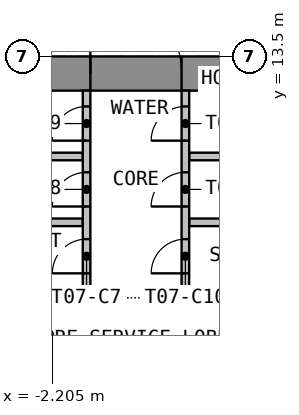
"""IFC4 building model, lengths in metres.
Left out: names, types, materials, properties, quantities, classifications, styles, units other than length and angle.
Written with IfcOpenShell. Run it as: python <this file> out.ifc"""

import sys

from ifc_helpers import new_model, si_unit, direction, frame, frame_2d, origin, place, context, subcontext, project, spatial, rectangle, extrude, element, fill, save


model = new_model("IFC4")
c1 = context("Model", 3, precision=1e-05, world=origin(), true_north=direction((0.0, 1.0)))
c2 = subcontext(c1, "Body", "Model", "MODEL_VIEW")
j1 = project(units=[si_unit("LENGTHUNIT", "METRE"), si_unit("PLANEANGLEUNIT", "RADIAN")], contexts=[c1])
p1 = place(None, origin())
s1 = spatial("IfcSite", under=j1, at=p1, CompositionType="ELEMENT")
p2 = place(p1, origin())
s2 = spatial("IfcBuilding", under=s1, at=p2, CompositionType="ELEMENT")
p3 = place(p2, frame((0.0, 0.0, 104.7)))
s3 = spatial("IfcBuildingStorey", under=s2, at=p3, CompositionType="ELEMENT", Elevation=104.7)
p4 = place(p3, frame((-18.0, 13.05, 0.0), z_axis=(0.0, 0.0, 1.0), x_axis=(1.0, 0.0, 0.0)))
e1 = element("IfcWall", 1, at=p4, inside=s3, PredefinedType="SHEAR", context=c2, shape_type="SweptSolid", body=[
    extrude(rectangle(XDim=36.0, YDim=0.9, at=frame_2d((18.0, 0.0))), origin(), (0.0, 0.0, 1.0), 3.525),
])
p5 = place(p4, frame((16.8, 0.0, 0.0)))
e2 = element("IfcOpeningElement", 2, at=p5, cuts=e1, PredefinedType="OPENING", context=c2, shape_type="SweptSolid", body=[
    extrude(rectangle(XDim=2.4, YDim=2.1, at=frame_2d((1.2, 1.05))), frame((0.0, 0.46, 0.0), z_axis=(0.0, -1.0, 0.0), x_axis=(1.0, 0.0, 0.0)), (0.0, 0.0, 1.0), 0.92),
])
p6 = place(p4, frame((5.55, 0.0, 0.0)))
e3 = element("IfcOpeningElement", 3, at=p6, cuts=e1, PredefinedType="OPENING", context=c2, shape_type="SweptSolid", body=[
    extrude(rectangle(XDim=1.2, YDim=2.1, at=frame_2d((0.6, 1.05))), frame((0.0, 0.46, 0.0), z_axis=(0.0, -1.0, 0.0), x_axis=(1.0, 0.0, 0.0)), (0.0, 0.0, 1.0), 0.92),
])
p7 = place(p4, frame((29.25, 0.0, 0.0)))
e4 = element("IfcOpeningElement", 4, at=p7, cuts=e1, PredefinedType="OPENING", context=c2, shape_type="SweptSolid", body=[
    extrude(rectangle(XDim=1.2, YDim=2.1, at=frame_2d((0.6, 1.05))), frame((0.0, 0.46, 0.0), z_axis=(0.0, -1.0, 0.0), x_axis=(1.0, 0.0, 0.0)), (0.0, 0.0, 1.0), 0.92),
])
for number, where, z_axis, x_axis in (
    (5, (-2.8, 7.25, 0.0), (0.0, 0.0, 1.0), (1.0, 0.0, 0.0)),
    (6, (-2.8, 9.135, 0.0), (0.0, 0.0, 1.0), (1.0, 0.0, 0.0)),
    (7, (-2.8, 10.867, 0.0), (0.0, 0.0, 1.0), (1.0, 0.0, 0.0)),
    (8, (1.4, 7.25, 0.0), (0.0, 0.0, 1.0), (1.0, 0.0, 0.0)),
    (9, (1.4, 9.135, 0.0), (0.0, 0.0, 1.0), (1.0, 0.0, 0.0)),
    (10, (1.4, 10.867, 0.0), (0.0, 0.0, 1.0), (1.0, 0.0, 0.0)),
):
    element("IfcWall", number, at=place(p3, frame(where, z_axis=z_axis, x_axis=x_axis)), inside=s3, PredefinedType="PARTITIONING", context=c2, shape_type="SweptSolid", body=[
        extrude(rectangle(XDim=1.4, YDim=0.2, at=frame_2d((0.7, 0.0))), origin(), (0.0, 0.0, 1.0), 3.525),
    ])
p8 = place(p3, frame((-1.3, 7.15, 0.0), z_axis=(0.0, 0.0, 1.0), x_axis=(0.0, 1.0, 0.0)))
e11 = element("IfcWall", 11, at=p8, inside=s3, PredefinedType="PARTITIONING", context=c2, shape_type="SweptSolid", body=[
    extrude(rectangle(XDim=5.45, YDim=0.2, at=frame_2d((2.725, 0.0))), origin(), (0.0, 0.0, 1.0), 3.525),
])
p9 = place(p8, frame((0.643, 0.0, 0.0)))
e12 = element("IfcOpeningElement", 12, at=p9, cuts=e11, PredefinedType="OPENING", context=c2, shape_type="SweptSolid", body=[
    extrude(rectangle(XDim=0.9, YDim=2.1, at=frame_2d((0.45, 1.05))), frame((0.0, 0.11, 0.0), z_axis=(0.0, -1.0, 0.0), x_axis=(1.0, 0.0, 0.0)), (0.0, 0.0, 1.0), 0.22),
])
p10 = place(p8, frame((2.401, 0.0, 0.0)))
e13 = element("IfcOpeningElement", 13, at=p10, cuts=e11, PredefinedType="OPENING", context=c2, shape_type="SweptSolid", body=[
    extrude(rectangle(XDim=0.9, YDim=2.1, at=frame_2d((0.45, 1.05))), frame((0.0, 0.11, 0.0), z_axis=(0.0, -1.0, 0.0), x_axis=(1.0, 0.0, 0.0)), (0.0, 0.0, 1.0), 0.22),
])
p11 = place(p8, frame((4.134, 0.0, 0.0)))
e14 = element("IfcOpeningElement", 14, at=p11, cuts=e11, PredefinedType="OPENING", context=c2, shape_type="SweptSolid", body=[
    extrude(rectangle(XDim=0.9, YDim=2.1, at=frame_2d((0.45, 1.05))), frame((0.0, 0.11, 0.0), z_axis=(0.0, -1.0, 0.0), x_axis=(1.0, 0.0, 0.0)), (0.0, 0.0, 1.0), 0.22),
])
p12 = place(p3, frame((1.3, 7.15, 0.0), z_axis=(0.0, 0.0, 1.0), x_axis=(0.0, 1.0, 0.0)))
e15 = element("IfcWall", 15, at=p12, inside=s3, PredefinedType="PARTITIONING", context=c2, shape_type="SweptSolid", body=[
    extrude(rectangle(XDim=5.45, YDim=0.2, at=frame_2d((2.725, 0.0))), origin(), (0.0, 0.0, 1.0), 3.525),
])
p13 = place(p12, frame((0.643, 0.0, 0.0)))
e16 = element("IfcOpeningElement", 16, at=p13, cuts=e15, PredefinedType="OPENING", context=c2, shape_type="SweptSolid", body=[
    extrude(rectangle(XDim=0.9, YDim=2.1, at=frame_2d((0.45, 1.05))), frame((0.0, 0.11, 0.0), z_axis=(0.0, -1.0, 0.0), x_axis=(1.0, 0.0, 0.0)), (0.0, 0.0, 1.0), 0.22),
])
p14 = place(p12, frame((2.401, 0.0, 0.0)))
e17 = element("IfcOpeningElement", 17, at=p14, cuts=e15, PredefinedType="OPENING", context=c2, shape_type="SweptSolid", body=[
    extrude(rectangle(XDim=0.9, YDim=2.1, at=frame_2d((0.45, 1.05))), frame((0.0, 0.11, 0.0), z_axis=(0.0, -1.0, 0.0), x_axis=(1.0, 0.0, 0.0)), (0.0, 0.0, 1.0), 0.22),
])
p15 = place(p12, frame((4.134, 0.0, 0.0)))
e18 = element("IfcOpeningElement", 18, at=p15, cuts=e15, PredefinedType="OPENING", context=c2, shape_type="SweptSolid", body=[
    extrude(rectangle(XDim=0.9, YDim=2.1, at=frame_2d((0.45, 1.05))), frame((0.0, 0.11, 0.0), z_axis=(0.0, -1.0, 0.0), x_axis=(1.0, 0.0, 0.0)), (0.0, 0.0, 1.0), 0.22),
])
p16 = place(p5, origin())
e19 = element("IfcDoor", 19, at=p16, inside=s3, OperationType="DOUBLE_DOOR_DOUBLE_SWING", PredefinedType="DOOR", context=c2, shape_type="SweptSolid", body=[
    extrude(rectangle(XDim=2.4, YDim=2.1, at=frame_2d((1.2, 1.05))), frame((0.0, 0.025, 0.0), z_axis=(0.0, -1.0, 0.0), x_axis=(1.0, 0.0, 0.0)), (0.0, 0.0, 1.0), 0.05),
])
fill(e2, e19)
p17 = place(p9, origin())
e20 = element("IfcDoor", 20, at=p17, inside=s3, OperationType="SINGLE_SWING_LEFT", PredefinedType="DOOR", context=c2, shape_type="SweptSolid", body=[
    extrude(rectangle(XDim=0.9, YDim=2.1, at=frame_2d((0.45, 1.05))), frame((0.0, 0.025, 0.0), z_axis=(0.0, -1.0, 0.0), x_axis=(1.0, 0.0, 0.0)), (0.0, 0.0, 1.0), 0.05),
])
fill(e12, e20)
p18 = place(p10, origin())
e21 = element("IfcDoor", 21, at=p18, inside=s3, OperationType="SINGLE_SWING_LEFT", PredefinedType="DOOR", context=c2, shape_type="SweptSolid", body=[
    extrude(rectangle(XDim=0.9, YDim=2.1, at=frame_2d((0.45, 1.05))), frame((0.0, 0.025, 0.0), z_axis=(0.0, -1.0, 0.0), x_axis=(1.0, 0.0, 0.0)), (0.0, 0.0, 1.0), 0.05),
])
fill(e13, e21)
p19 = place(p11, origin())
e22 = element("IfcDoor", 22, at=p19, inside=s3, OperationType="SINGLE_SWING_LEFT", PredefinedType="DOOR", context=c2, shape_type="SweptSolid", body=[
    extrude(rectangle(XDim=0.9, YDim=2.1, at=frame_2d((0.45, 1.05))), frame((0.0, 0.025, 0.0), z_axis=(0.0, -1.0, 0.0), x_axis=(1.0, 0.0, 0.0)), (0.0, 0.0, 1.0), 0.05),
])
fill(e14, e22)
p20 = place(p13, origin())
e23 = element("IfcDoor", 23, at=p20, inside=s3, OperationType="SINGLE_SWING_LEFT", PredefinedType="DOOR", context=c2, shape_type="SweptSolid", body=[
    extrude(rectangle(XDim=0.9, YDim=2.1, at=frame_2d((0.45, 1.05))), frame((0.0, 0.025, 0.0), z_axis=(0.0, -1.0, 0.0), x_axis=(1.0, 0.0, 0.0)), (0.0, 0.0, 1.0), 0.05),
])
fill(e16, e23)
p21 = place(p14, origin())
e24 = element("IfcDoor", 24, at=p21, inside=s3, OperationType="SINGLE_SWING_LEFT", PredefinedType="DOOR", context=c2, shape_type="SweptSolid", body=[
    extrude(rectangle(XDim=0.9, YDim=2.1, at=frame_2d((0.45, 1.05))), frame((0.0, 0.025, 0.0), z_axis=(0.0, -1.0, 0.0), x_axis=(1.0, 0.0, 0.0)), (0.0, 0.0, 1.0), 0.05),
])
fill(e17, e24)
p22 = place(p15, origin())
e25 = element("IfcDoor", 25, at=p22, inside=s3, OperationType="SINGLE_SWING_LEFT", PredefinedType="DOOR", context=c2, shape_type="SweptSolid", body=[
    extrude(rectangle(XDim=0.9, YDim=2.1, at=frame_2d((0.45, 1.05))), frame((0.0, 0.025, 0.0), z_axis=(0.0, -1.0, 0.0), x_axis=(1.0, 0.0, 0.0)), (0.0, 0.0, 1.0), 0.05),
])
fill(e18, e25)
save(model, sys.argv[1])
